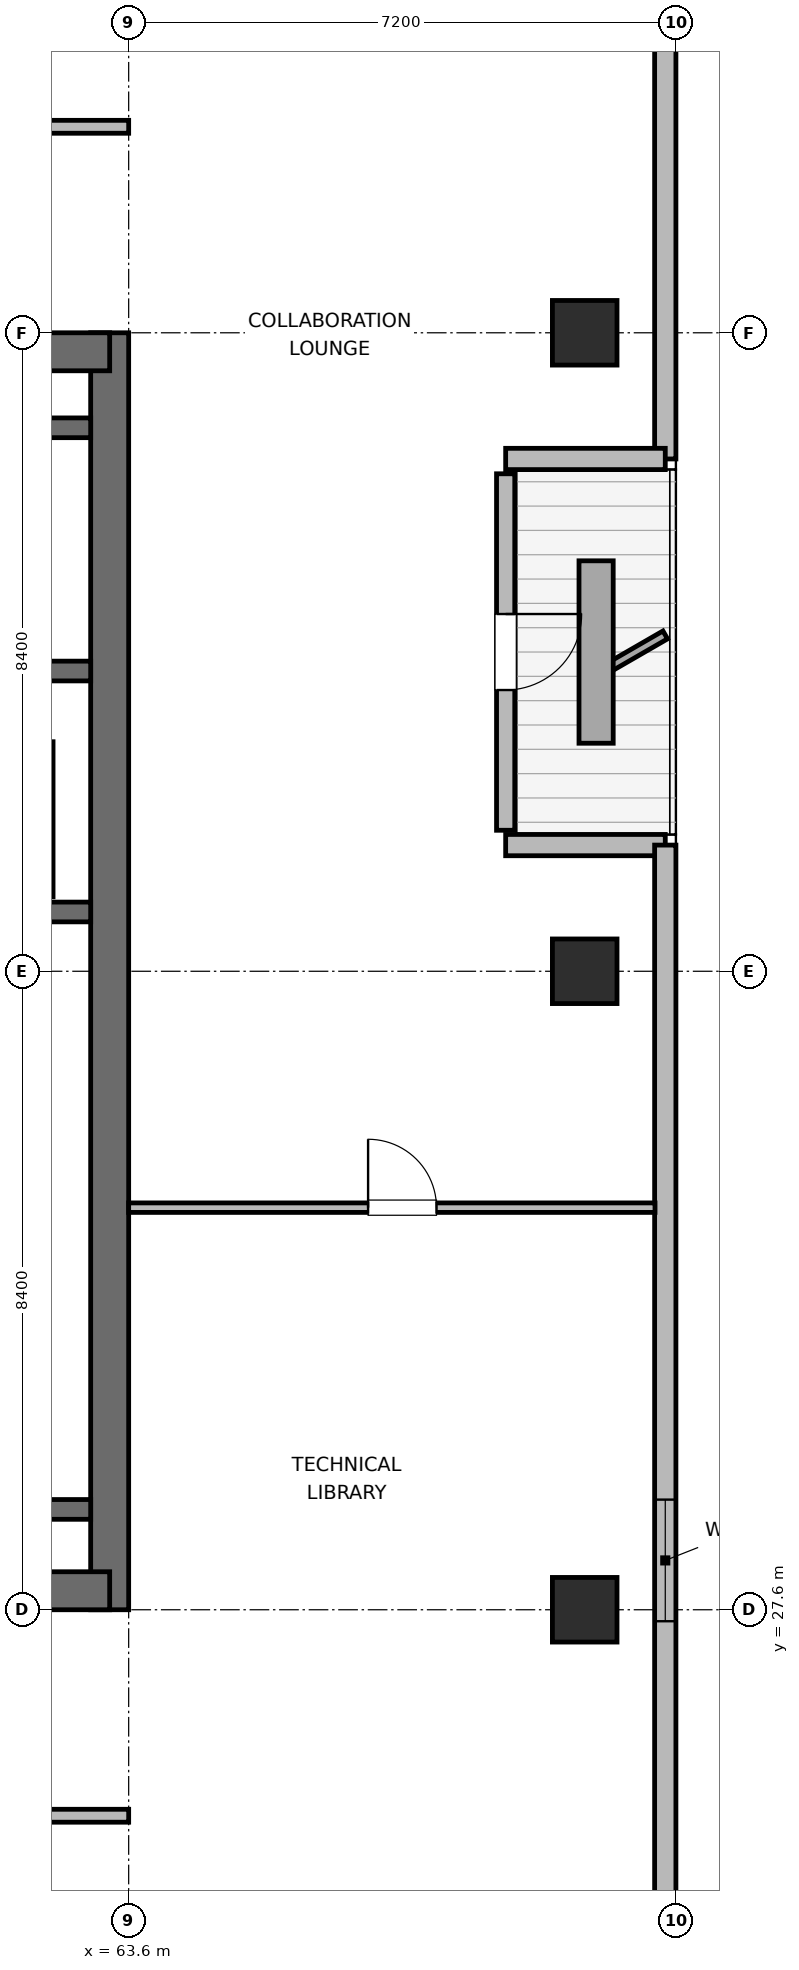
"""IFC4 building model, lengths in metres.
Left out: names, types, materials, properties, quantities, classifications, styles, units other than length and angle.
Written with IfcOpenShell. Run it as: python <this file> out.ifc"""

import sys

from ifc_helpers import new_model, si_unit, direction, frame, frame_2d, origin, origin_2d, place, context, subcontext, project, spatial, rectangle, extrude, element, fill, save


model = new_model("IFC4")
c1 = context("Model", 3, precision=1e-05, world=origin(), true_north=direction((0.0, 1.0)))
c2 = subcontext(c1, "Body", "Model", "MODEL_VIEW")
j1 = project(units=[si_unit("LENGTHUNIT", "METRE"), si_unit("PLANEANGLEUNIT", "RADIAN")], contexts=[c1])
p1 = place(None, origin())
s1 = spatial("IfcSite", under=j1, at=p1, CompositionType="ELEMENT")
p2 = place(p1, origin())
s2 = spatial("IfcBuilding", under=s1, at=p2, CompositionType="ELEMENT")
p3 = place(p2, frame((0.0, 0.0, 342.0)))
s3 = spatial("IfcBuildingStorey", under=s2, at=p3, CompositionType="ELEMENT", Elevation=342.0)
p4 = place(p3, frame((63.35, 27.6, 0.0), z_axis=(0.0, 0.0, 1.0), x_axis=(0.0, 1.0, 0.0)))
e1 = element("IfcWall", 1, at=p4, inside=s3, PredefinedType="SHEAR", context=c2, shape_type="SweptSolid", body=[
    extrude(rectangle(XDim=16.8, YDim=0.5, at=frame_2d((8.4, 0.0))), origin(), (0.0, 0.0, 1.0), 4.5),
])
p5 = place(p3, frame((53.85, 27.85, 0.0), z_axis=(0.0, 0.0, 1.0), x_axis=(1.0, 0.0, 0.0)))
e2 = element("IfcWall", 2, at=p5, inside=s3, PredefinedType="SHEAR", context=c2, shape_type="SweptSolid", body=[
    extrude(rectangle(XDim=9.5, YDim=0.5, at=frame_2d((4.75, 0.0))), origin(), (0.0, 0.0, 1.0), 4.5),
])
p6 = place(p5, frame((4.025, 0.0, 0.0)))
e3 = element("IfcOpeningElement", 3, at=p6, cuts=e2, PredefinedType="OPENING", context=c2, shape_type="SweptSolid", body=[
    extrude(rectangle(XDim=1.05, YDim=2.04, at=frame_2d((0.525, 1.02))), frame((0.0, 0.26, 0.0), z_axis=(0.0, -1.0, 0.0), x_axis=(1.0, 0.0, 0.0)), (0.0, 0.0, 1.0), 0.52),
])
p7 = place(p3, frame((53.85, 44.15, 0.0), z_axis=(0.0, 0.0, 1.0), x_axis=(1.0, 0.0, 0.0)))
e4 = element("IfcWall", 4, at=p7, inside=s3, PredefinedType="SHEAR", context=c2, shape_type="SweptSolid", body=[
    extrude(rectangle(XDim=9.5, YDim=0.5, at=frame_2d((4.75, 0.0))), origin(), (0.0, 0.0, 1.0), 4.5),
])
for number, where, z_axis, x_axis in (
    (5, (58.89, 28.92, 0.0), (0.0, 0.0, 1.0), (1.0, 0.0, 0.0)),
    (6, (58.89, 36.78, 0.0), (0.0, 0.0, 1.0), (1.0, 0.0, 0.0)),
):
    element("IfcWall", number, at=place(p3, frame(where, z_axis=z_axis, x_axis=x_axis)), inside=s3, PredefinedType="SHEAR", context=c2, shape_type="SweptSolid", body=[
        extrude(rectangle(XDim=4.21, YDim=0.26, at=frame_2d((2.105, 0.0))), origin(), (0.0, 0.0, 1.0), 4.5),
    ])
p8 = place(p3, frame((54.1, 39.95, 0.0), z_axis=(0.0, 0.0, 1.0), x_axis=(1.0, 0.0, 0.0)))
e7 = element("IfcWall", 7, at=p8, inside=s3, PredefinedType="SHEAR", context=c2, shape_type="SweptSolid", body=[
    extrude(rectangle(XDim=9.0, YDim=0.26, at=frame_2d((4.5, 0.0))), origin(), (0.0, 0.0, 1.0), 4.5),
])
p9 = place(p8, frame((1.1, 0.0, 0.0)))
e8 = element("IfcOpeningElement", 8, at=p9, cuts=e7, PredefinedType="OPENING", context=c2, shape_type="SweptSolid", body=[
    extrude(rectangle(XDim=1.0, YDim=2.04, at=frame_2d((0.5, 1.02))), frame((0.0, 0.14, 0.0), z_axis=(0.0, -1.0, 0.0), x_axis=(1.0, 0.0, 0.0)), (0.0, 0.0, 1.0), 0.28),
])
p10 = place(p3, frame((54.1, 43.15, 0.0), z_axis=(0.0, 0.0, 1.0), x_axis=(1.0, 0.0, 0.0)))
e9 = element("IfcWall", 9, at=p10, inside=s3, PredefinedType="SHEAR", context=c2, shape_type="SweptSolid", body=[
    extrude(rectangle(XDim=9.0, YDim=0.26, at=frame_2d((4.5, 0.0))), origin(), (0.0, 0.0, 1.0), 4.5),
])
for number, where, z_axis, x_axis in (
    (10, (69.6, 27.6, 0.0), (0.0, 0.0, 1.0), (1.0, 0.0, 0.0)),
    (11, (69.6, 36.0, 0.0), (0.0, 0.0, 1.0), (1.0, 0.0, 0.0)),
    (12, (69.6, 44.4, 0.0), (0.0, 0.0, 1.0), (1.0, 0.0, 0.0)),
):
    element("IfcColumn", number, at=place(p3, frame(where, z_axis=z_axis, x_axis=x_axis)), inside=s3, PredefinedType="COLUMN", context=c2, shape_type="SweptSolid", body=[
        extrude(rectangle(XDim=0.85, YDim=0.85, at=origin_2d()), origin(), (0.0, 0.0, 1.0), 4.5),
    ])
p11 = place(p3, frame((70.66, 48.582, 0.0), z_axis=(0.0, 0.0, 1.0), x_axis=(0.0, -1.0, 0.0)))
e13 = element("IfcWall", 13, at=p11, inside=s3, PredefinedType="SOLIDWALL", context=c2, shape_type="SweptSolid", body=[
    extrude(rectangle(XDim=5.842, YDim=0.28, at=frame_2d((2.921, 0.0))), origin(), (0.0, 0.0, 1.0), 4.28),
])
p12 = place(p3, frame((70.66, 42.74, 0.0), z_axis=(0.0, 0.0, 1.0), x_axis=(-1.0, 0.0, 0.0)))
e14 = element("IfcWall", 14, at=p12, inside=s3, PredefinedType="SOLIDWALL", context=c2, shape_type="SweptSolid", body=[
    extrude(rectangle(XDim=2.1, YDim=0.28, at=frame_2d((1.05, 0.0))), origin(), (0.0, 0.0, 1.0), 3.726),
])
p13 = place(p3, frame((68.56, 42.545, 0.0), z_axis=(0.0, 0.0, 1.0), x_axis=(0.0, -1.0, 0.0)))
e15 = element("IfcWall", 15, at=p13, inside=s3, PredefinedType="SOLIDWALL", context=c2, shape_type="SweptSolid", body=[
    extrude(rectangle(XDim=4.69, YDim=0.24, at=frame_2d((2.345, 0.0))), origin(), (0.0, 0.0, 1.0), 3.911),
])
p14 = place(p13, frame((1.845, 0.0, 0.0)))
e16 = element("IfcOpeningElement", 16, at=p14, cuts=e15, PredefinedType="OPENING", context=c2, shape_type="SweptSolid", body=[
    extrude(rectangle(XDim=1.0, YDim=2.02, at=frame_2d((0.5, 1.01))), frame((0.0, 0.13, 0.0), z_axis=(0.0, -1.0, 0.0), x_axis=(1.0, 0.0, 0.0)), (0.0, 0.0, 1.0), 0.26),
])
p15 = place(p3, frame((68.56, 37.66, 0.0), z_axis=(0.0, 0.0, 1.0), x_axis=(1.0, 0.0, 0.0)))
e17 = element("IfcWall", 17, at=p15, inside=s3, PredefinedType="SOLIDWALL", context=c2, shape_type="SweptSolid", body=[
    extrude(rectangle(XDim=2.1, YDim=0.28, at=frame_2d((1.05, 0.0))), origin(), (0.0, 0.0, 1.0), 3.726),
])
p16 = place(p3, frame((70.66, 37.66, 0.0), z_axis=(0.0, 0.0, 1.0), x_axis=(0.0, -1.0, 0.0)))
e18 = element("IfcWall", 18, at=p16, inside=s3, PredefinedType="SOLIDWALL", context=c2, shape_type="SweptSolid", body=[
    extrude(rectangle(XDim=14.241, YDim=0.28, at=frame_2d((7.121, 0.0))), origin(), (0.0, 0.0, 1.0), 4.28),
])
p17 = place(p16, frame((8.611, 0.0, 0.85)))
e19 = element("IfcOpeningElement", 19, at=p17, cuts=e18, PredefinedType="OPENING", context=c2, shape_type="SweptSolid", body=[
    extrude(rectangle(XDim=1.6, YDim=1.0, at=frame_2d((0.8, 0.5))), frame((0.0, 0.15, 0.0), z_axis=(0.0, -1.0, 0.0), x_axis=(1.0, 0.0, 0.0)), (0.0, 0.0, 1.0), 0.3),
])
p18 = place(p3, frame((62.5, 36.98, 0.0), z_axis=(0.0, 0.0, 1.0), x_axis=(0.0, 1.0, 0.0)))
e20 = element("IfcWall", 20, at=p18, inside=s3, PredefinedType="PARTITIONING", context=c2, shape_type="SweptSolid", body=[
    extrude(rectangle(XDim=2.04, YDim=0.21, at=frame_2d((1.02, 0.0))), origin(), (0.0, 0.0, 1.0), 4.28),
])
p19 = place(p3, frame((29.8, 24.89, 0.0), z_axis=(0.0, 0.0, 1.0), x_axis=(1.0, 0.0, 0.0)))
e21 = element("IfcWall", 21, at=p19, inside=s3, PredefinedType="PARTITIONING", context=c2, shape_type="SweptSolid", body=[
    extrude(rectangle(XDim=33.8, YDim=0.17, at=frame_2d((16.9, 0.0))), origin(), (0.0, 0.0, 1.0), 4.28),
])
p20 = place(p19, frame((7.975, 0.0, 0.0)))
e22 = element("IfcOpeningElement", 22, at=p20, cuts=e21, PredefinedType="OPENING", context=c2, shape_type="SweptSolid", body=[
    extrude(rectangle(XDim=0.95, YDim=2.04, at=frame_2d((0.475, 1.02))), frame((0.0, 0.095, 0.0), z_axis=(0.0, -1.0, 0.0), x_axis=(1.0, 0.0, 0.0)), (0.0, 0.0, 1.0), 0.19),
])
p21 = place(p19, frame((24.875, 0.0, 0.0)))
e23 = element("IfcOpeningElement", 23, at=p21, cuts=e21, PredefinedType="OPENING", context=c2, shape_type="SweptSolid", body=[
    extrude(rectangle(XDim=0.95, YDim=2.04, at=frame_2d((0.475, 1.02))), frame((0.0, 0.095, 0.0), z_axis=(0.0, -1.0, 0.0), x_axis=(1.0, 0.0, 0.0)), (0.0, 0.0, 1.0), 0.19),
])
p22 = place(p3, frame((29.8, 47.11, 0.0), z_axis=(0.0, 0.0, 1.0), x_axis=(1.0, 0.0, 0.0)))
e24 = element("IfcWall", 24, at=p22, inside=s3, PredefinedType="PARTITIONING", context=c2, shape_type="SweptSolid", body=[
    extrude(rectangle(XDim=33.8, YDim=0.17, at=frame_2d((16.9, 0.0))), origin(), (0.0, 0.0, 1.0), 4.28),
])
p23 = place(p22, frame((5.89, 0.0, 0.0)))
e25 = element("IfcOpeningElement", 25, at=p23, cuts=e24, PredefinedType="OPENING", context=c2, shape_type="SweptSolid", body=[
    extrude(rectangle(XDim=0.95, YDim=2.04, at=frame_2d((0.475, 1.02))), frame((0.0, 0.095, 0.0), z_axis=(0.0, -1.0, 0.0), x_axis=(1.0, 0.0, 0.0)), (0.0, 0.0, 1.0), 0.19),
])
p24 = place(p22, frame((19.31, 0.0, 0.0)))
e26 = element("IfcOpeningElement", 26, at=p24, cuts=e24, PredefinedType="OPENING", context=c2, shape_type="SweptSolid", body=[
    extrude(rectangle(XDim=0.95, YDim=2.04, at=frame_2d((0.475, 1.02))), frame((0.0, 0.095, 0.0), z_axis=(0.0, -1.0, 0.0), x_axis=(1.0, 0.0, 0.0)), (0.0, 0.0, 1.0), 0.19),
])
p25 = place(p22, frame((29.845, 0.0, 0.0)))
e27 = element("IfcOpeningElement", 27, at=p25, cuts=e24, PredefinedType="OPENING", context=c2, shape_type="SweptSolid", body=[
    extrude(rectangle(XDim=0.95, YDim=2.04, at=frame_2d((0.475, 1.02))), frame((0.0, 0.095, 0.0), z_axis=(0.0, -1.0, 0.0), x_axis=(1.0, 0.0, 0.0)), (0.0, 0.0, 1.0), 0.19),
])
p26 = place(p3, frame((63.6, 32.89, 0.0), z_axis=(0.0, 0.0, 1.0), x_axis=(1.0, 0.0, 0.0)))
e28 = element("IfcWall", 28, at=p26, inside=s3, PredefinedType="PARTITIONING", context=c2, shape_type="SweptSolid", body=[
    extrude(rectangle(XDim=6.925, YDim=0.125, at=frame_2d((3.462, 0.0))), origin(), (0.0, 0.0, 1.0), 4.28),
])
p27 = place(p26, frame((3.15, 0.0, 0.0)))
e29 = element("IfcOpeningElement", 29, at=p27, cuts=e28, PredefinedType="OPENING", context=c2, shape_type="SweptSolid", body=[
    extrude(rectangle(XDim=0.9, YDim=2.02, at=frame_2d((0.45, 1.01))), frame((0.0, 0.073, 0.0), z_axis=(0.0, -1.0, 0.0), x_axis=(1.0, 0.0, 0.0)), (0.0, 0.0, 1.0), 0.145),
])
p28 = place(p14, origin())
e30 = element("IfcDoor", 30, at=p28, inside=s3, OperationType="SINGLE_SWING_LEFT", PredefinedType="DOOR", context=c2, shape_type="SweptSolid", body=[
    extrude(rectangle(XDim=1.0, YDim=2.02, at=frame_2d((0.5, 1.01))), frame((0.0, 0.025, 0.0), z_axis=(0.0, -1.0, 0.0), x_axis=(1.0, 0.0, 0.0)), (0.0, 0.0, 1.0), 0.05),
])
fill(e16, e30)
p29 = place(p17, origin())
e31 = element("IfcWindow", 31, at=p29, inside=s3, PartitioningType="SINGLE_PANEL", PredefinedType="WINDOW", context=c2, shape_type="SweptSolid", body=[
    extrude(rectangle(XDim=1.6, YDim=1.0, at=frame_2d((0.8, 0.5))), frame((0.0, 0.03, 0.0), z_axis=(0.0, -1.0, 0.0), x_axis=(1.0, 0.0, 0.0)), (0.0, 0.0, 1.0), 0.06),
])
fill(e19, e31)
p30 = place(p27, origin())
e32 = element("IfcDoor", 32, at=p30, inside=s3, OperationType="SINGLE_SWING_LEFT", PredefinedType="DOOR", context=c2, shape_type="SweptSolid", body=[
    extrude(rectangle(XDim=0.9, YDim=2.02, at=frame_2d((0.45, 1.01))), frame((0.0, 0.025, 0.0), z_axis=(0.0, -1.0, 0.0), x_axis=(1.0, 0.0, 0.0)), (0.0, 0.0, 1.0), 0.05),
])
fill(e29, e32)
save(model, sys.argv[1])
